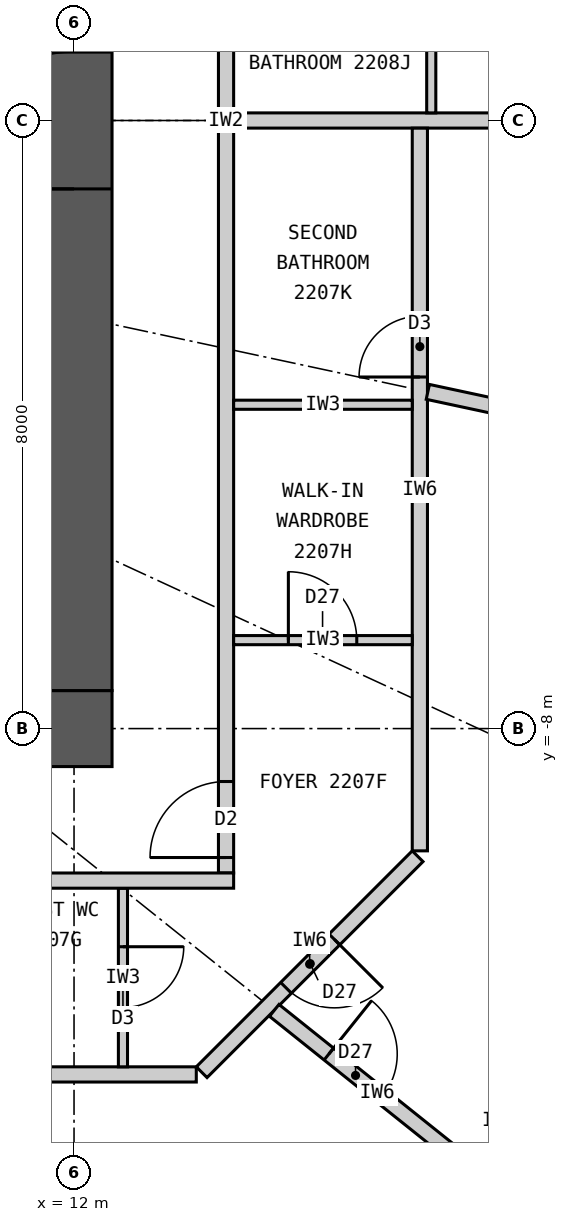
"""IFC4 building model, lengths in metres.
Left out: names, types, materials, properties, quantities, classifications, styles, units other than length and angle.
Written with IfcOpenShell. Run it as: python <this file> out.ifc"""

import sys

from ifc_helpers import new_model, si_unit, direction, frame, frame_2d, origin, place, context, subcontext, project, spatial, rectangle, extrude, element, fill, save


model = new_model("IFC4")
c1 = context("Model", 3, precision=1e-05, world=origin(), true_north=direction((0.0, 1.0)))
c2 = subcontext(c1, "Body", "Model", "MODEL_VIEW")
j1 = project(units=[si_unit("LENGTHUNIT", "METRE"), si_unit("PLANEANGLEUNIT", "RADIAN")], contexts=[c1])
p1 = place(None, origin())
s1 = spatial("IfcSite", under=j1, at=p1, CompositionType="ELEMENT")
p2 = place(p1, origin())
s2 = spatial("IfcBuilding", under=s1, at=p2, CompositionType="ELEMENT")
p3 = place(p2, frame((0.0, 0.0, 87.0)))
s3 = spatial("IfcBuildingStorey", under=s2, at=p3, CompositionType="ELEMENT", Elevation=87.0)
p4 = place(p3, frame((12.5, -8.0, 0.0), z_axis=(0.0, 0.0, 1.0), x_axis=(-1.0, 0.0, 0.0)))
e1 = element("IfcWall", 1, at=p4, inside=s3, PredefinedType="SHEAR", context=c2, shape_type="SweptSolid", body=[
    extrude(rectangle(XDim=25.0, YDim=1.0, at=frame_2d((12.5, 0.0))), origin(), (0.0, 0.0, 1.0), 3.3),
])
p5 = place(p4, frame((11.2, 0.0, 0.0)))
e2 = element("IfcOpeningElement", 2, at=p5, cuts=e1, PredefinedType="OPENING", context=c2, shape_type="SweptSolid", body=[
    extrude(rectangle(XDim=1.2, YDim=2.2, at=frame_2d((0.6, 1.1))), frame((0.0, 0.51, 0.0), z_axis=(0.0, -1.0, 0.0), x_axis=(1.0, 0.0, 0.0)), (0.0, 0.0, 1.0), 1.02),
])
p6 = place(p4, frame((18.8, 0.0, 0.0)))
e3 = element("IfcOpeningElement", 3, at=p6, cuts=e1, PredefinedType="OPENING", context=c2, shape_type="SweptSolid", body=[
    extrude(rectangle(XDim=0.9, YDim=2.2, at=frame_2d((0.45, 1.1))), frame((0.0, 0.51, 0.0), z_axis=(0.0, -1.0, 0.0), x_axis=(1.0, 0.0, 0.0)), (0.0, 0.0, 1.0), 1.02),
])
p7 = place(p3, frame((12.0, -7.5, 0.0), z_axis=(0.0, 0.0, 1.0), x_axis=(0.0, 1.0, 0.0)))
e4 = element("IfcWall", 4, at=p7, inside=s3, PredefinedType="SHEAR", context=c2, shape_type="SweptSolid", body=[
    extrude(rectangle(XDim=15.0, YDim=1.0, at=frame_2d((7.5, 0.0))), origin(), (0.0, 0.0, 1.0), 3.3),
])
p8 = place(p7, frame((6.6, 0.0, 0.0)))
e5 = element("IfcOpeningElement", 5, at=p8, cuts=e4, PredefinedType="OPENING", context=c2, shape_type="SweptSolid", body=[
    extrude(rectangle(XDim=1.8, YDim=2.2, at=frame_2d((0.9, 1.1))), frame((0.0, 0.51, 0.0), z_axis=(0.0, -1.0, 0.0), x_axis=(1.0, 0.0, 0.0)), (0.0, 0.0, 1.0), 1.02),
])
p9 = place(p3, frame((14.0, -9.9, 0.0), z_axis=(0.0, 0.0, 1.0), x_axis=(0.0, 1.0, 0.0)))
e6 = element("IfcWall", 6, at=p9, inside=s3, PredefinedType="PARTITIONING", context=c2, shape_type="SweptSolid", body=[
    extrude(rectangle(XDim=19.8, YDim=0.2, at=frame_2d((9.9, 0.0))), origin(), (0.0, 0.0, 1.0), 3.12),
])
p10 = place(p9, frame((0.204, 0.0, 0.0)))
e7 = element("IfcOpeningElement", 7, at=p10, cuts=e6, PredefinedType="OPENING", context=c2, shape_type="SweptSolid", body=[
    extrude(rectangle(XDim=1.0, YDim=2.2, at=frame_2d((0.5, 1.1))), frame((0.0, 0.11, 0.0), z_axis=(0.0, -1.0, 0.0), x_axis=(1.0, 0.0, 0.0)), (0.0, 0.0, 1.0), 0.22),
])
p11 = place(p9, frame((13.715, 0.0, 0.0)))
e8 = element("IfcOpeningElement", 8, at=p11, cuts=e6, PredefinedType="OPENING", context=c2, shape_type="SweptSolid", body=[
    extrude(rectangle(XDim=1.0, YDim=2.2, at=frame_2d((0.5, 1.1))), frame((0.0, 0.11, 0.0), z_axis=(0.0, -1.0, 0.0), x_axis=(1.0, 0.0, 0.0)), (0.0, 0.0, 1.0), 0.22),
])
p12 = place(p9, frame((18.698, 0.0, 0.0)))
e9 = element("IfcOpeningElement", 9, at=p12, cuts=e6, PredefinedType="OPENING", context=c2, shape_type="SweptSolid", body=[
    extrude(rectangle(XDim=1.0, YDim=2.2, at=frame_2d((0.5, 1.1))), frame((0.0, 0.11, 0.0), z_axis=(0.0, -1.0, 0.0), x_axis=(1.0, 0.0, 0.0)), (0.0, 0.0, 1.0), 0.22),
])
p13 = place(p3, frame((14.1, 0.0, 0.0), z_axis=(0.0, 0.0, 1.0), x_axis=(1.0, 0.0, 0.0)))
e10 = element("IfcWall", 10, at=p13, inside=s3, PredefinedType="PARTITIONING", context=c2, shape_type="SweptSolid", body=[
    extrude(rectangle(XDim=10.75, YDim=0.2, at=frame_2d((5.375, 0.0))), origin(), (0.0, 0.0, 1.0), 2.22),
])
p14 = place(p3, frame((7.289, -10.1, 0.0), z_axis=(0.0, 0.0, 1.0), x_axis=(0.585198353053, -0.810890182197, 0.0)))
e11 = element("IfcWall", 11, at=p14, inside=s3, PredefinedType="PARTITIONING", context=c2, shape_type="SweptSolid", body=[
    extrude(rectangle(XDim=8.36, YDim=0.2, at=frame_2d((4.18, 0.0))), origin(), (0.0, 0.0, 1.0), 2.27),
])
p15 = place(p3, frame((9.232, -12.55, 0.0), z_axis=(0.0, 0.0, 1.0), x_axis=(1.0, 0.0, 0.0)))
e12 = element("IfcWall", 12, at=p15, inside=s3, PredefinedType="PARTITIONING", context=c2, shape_type="SweptSolid", body=[
    extrude(rectangle(XDim=4.377, YDim=0.2, at=frame_2d((2.188, 0.0))), origin(), (0.0, 0.0, 1.0), 3.12),
])
p16 = place(p15, frame((0.685, 0.0, 0.0)))
e13 = element("IfcOpeningElement", 13, at=p16, cuts=e12, PredefinedType="OPENING", context=c2, shape_type="SweptSolid", body=[
    extrude(rectangle(XDim=0.8, YDim=2.1, at=frame_2d((0.4, 1.05))), frame((0.0, 0.11, 0.0), z_axis=(0.0, -1.0, 0.0), x_axis=(1.0, 0.0, 0.0)), (0.0, 0.0, 1.0), 0.22),
])
p17 = place(p3, frame((13.679, -12.521, 0.0), z_axis=(0.0, 0.0, 1.0), x_axis=(0.707106781187, 0.707106781187, 0.0)))
e14 = element("IfcWall", 14, at=p17, inside=s3, PredefinedType="PARTITIONING", context=c2, shape_type="SweptSolid", body=[
    extrude(rectangle(XDim=4.019, YDim=0.2, at=frame_2d((2.009, 0.0))), origin(), (0.0, 0.0, 1.0), 3.12),
])
p18 = place(p17, frame((1.57, 0.0, 0.0)))
e15 = element("IfcOpeningElement", 15, at=p18, cuts=e14, PredefinedType="OPENING", context=c2, shape_type="SweptSolid", body=[
    extrude(rectangle(XDim=0.9, YDim=2.1, at=frame_2d((0.45, 1.05))), frame((0.0, 0.11, 0.0), z_axis=(0.0, -1.0, 0.0), x_axis=(1.0, 0.0, 0.0)), (0.0, 0.0, 1.0), 0.22),
])
p19 = place(p3, frame((16.55, -9.609, 0.0), z_axis=(0.0, 0.0, 1.0), x_axis=(0.0, 1.0, 0.0)))
e16 = element("IfcWall", 16, at=p19, inside=s3, PredefinedType="PARTITIONING", context=c2, shape_type="SweptSolid", body=[
    extrude(rectangle(XDim=9.508, YDim=0.2, at=frame_2d((4.754, 0.0))), origin(), (0.0, 0.0, 1.0), 3.12),
])
p20 = place(p19, frame((6.234, 0.0, 0.0)))
e17 = element("IfcOpeningElement", 17, at=p20, cuts=e16, PredefinedType="OPENING", context=c2, shape_type="SweptSolid", body=[
    extrude(rectangle(XDim=0.8, YDim=2.1, at=frame_2d((0.4, 1.05))), frame((0.0, 0.11, 0.0), z_axis=(0.0, -1.0, 0.0), x_axis=(1.0, 0.0, 0.0)), (0.0, 0.0, 1.0), 0.22),
])
p21 = place(p3, frame((14.634, -11.707, 0.0), z_axis=(0.0, 0.0, 1.0), x_axis=(0.780903110683, -0.624652168591, 0.0)))
e18 = element("IfcWall", 18, at=p21, inside=s3, PredefinedType="PARTITIONING", context=c2, shape_type="SweptSolid", body=[
    extrude(rectangle(XDim=3.472, YDim=0.2, at=frame_2d((1.736, 0.0))), origin(), (0.0, 0.0, 1.0), 2.27),
])
p22 = place(p21, frame((0.92, 0.0, 0.0)))
e19 = element("IfcOpeningElement", 19, at=p22, cuts=e18, PredefinedType="OPENING", context=c2, shape_type="SweptSolid", body=[
    extrude(rectangle(XDim=0.9, YDim=2.1, at=frame_2d((0.45, 1.05))), frame((0.0, 0.11, 0.0), z_axis=(0.0, -1.0, 0.0), x_axis=(1.0, 0.0, 0.0)), (0.0, 0.0, 1.0), 0.22),
])
p23 = place(p3, frame((16.655, -3.57, 0.0), z_axis=(0.0, 0.0, 1.0), x_axis=(0.977790461522, -0.209584859557, 0.0)))
e20 = element("IfcWall", 20, at=p23, inside=s3, PredefinedType="PARTITIONING", context=c2, shape_type="SweptSolid", body=[
    extrude(rectangle(XDim=7.474, YDim=0.2, at=frame_2d((3.737, 0.0))), origin(), (0.0, 0.0, 1.0), 2.27),
])
p24 = place(p23, frame((1.621, 0.0, 0.0)))
e21 = element("IfcOpeningElement", 21, at=p24, cuts=e20, PredefinedType="OPENING", context=c2, shape_type="SweptSolid", body=[
    extrude(rectangle(XDim=0.9, YDim=2.1, at=frame_2d((0.45, 1.05))), frame((0.0, 0.11, 0.0), z_axis=(0.0, -1.0, 0.0), x_axis=(1.0, 0.0, 0.0)), (0.0, 0.0, 1.0), 0.22),
])
p25 = place(p3, frame((12.644, -10.1, 0.0), z_axis=(0.0, 0.0, 1.0), x_axis=(0.0, -1.0, 0.0)))
e22 = element("IfcWall", 22, at=p25, inside=s3, PredefinedType="PARTITIONING", context=c2, shape_type="SweptSolid", body=[
    extrude(rectangle(XDim=2.35, YDim=0.12, at=frame_2d((1.175, 0.0))), origin(), (0.0, 0.0, 1.0), 3.12),
])
p26 = place(p25, frame((0.77, 0.0, 0.0)))
e23 = element("IfcOpeningElement", 23, at=p26, cuts=e22, PredefinedType="OPENING", context=c2, shape_type="SweptSolid", body=[
    extrude(rectangle(XDim=0.8, YDim=2.1, at=frame_2d((0.4, 1.05))), frame((0.0, 0.07, 0.0), z_axis=(0.0, -1.0, 0.0), x_axis=(1.0, 0.0, 0.0)), (0.0, 0.0, 1.0), 0.14),
])
p27 = place(p3, frame((14.1, -6.836, 0.0), z_axis=(0.0, 0.0, 1.0), x_axis=(1.0, 0.0, 0.0)))
e24 = element("IfcWall", 24, at=p27, inside=s3, PredefinedType="PARTITIONING", context=c2, shape_type="SweptSolid", body=[
    extrude(rectangle(XDim=2.35, YDim=0.12, at=frame_2d((1.175, 0.0))), origin(), (0.0, 0.0, 1.0), 3.12),
])
p28 = place(p27, frame((0.72, 0.0, 0.0)))
e25 = element("IfcOpeningElement", 25, at=p28, cuts=e24, PredefinedType="OPENING", context=c2, shape_type="SweptSolid", body=[
    extrude(rectangle(XDim=0.9, YDim=2.1, at=frame_2d((0.45, 1.05))), frame((0.0, 0.07, 0.0), z_axis=(0.0, -1.0, 0.0), x_axis=(1.0, 0.0, 0.0)), (0.0, 0.0, 1.0), 0.14),
])
p29 = place(p3, frame((14.1, -3.74, 0.0), z_axis=(0.0, 0.0, 1.0), x_axis=(1.0, 0.0, 0.0)))
e26 = element("IfcWall", 26, at=p29, inside=s3, PredefinedType="PARTITIONING", context=c2, shape_type="SweptSolid", body=[
    extrude(rectangle(XDim=2.35, YDim=0.12, at=frame_2d((1.175, 0.0))), origin(), (0.0, 0.0, 1.0), 2.27),
])
p30 = place(p3, frame((16.7, 0.1, 0.0), z_axis=(0.0, 0.0, 1.0), x_axis=(0.0, 1.0, 0.0)))
e27 = element("IfcWall", 27, at=p30, inside=s3, PredefinedType="PARTITIONING", context=c2, shape_type="SweptSolid", body=[
    extrude(rectangle(XDim=2.34, YDim=0.12, at=frame_2d((1.17, 0.0))), origin(), (0.0, 0.0, 1.0), 3.12),
])
p31 = place(p3, frame((14.1, -10.0, 0.0), z_axis=(0.0, 0.0, 1.0), x_axis=(-1.0, 0.0, 0.0)))
e28 = element("IfcWall", 28, at=p31, inside=s3, PredefinedType="PARTITIONING", context=c2, shape_type="SweptSolid", body=[
    extrude(rectangle(XDim=24.429, YDim=0.2, at=frame_2d((12.215, 0.0))), origin(), (0.0, 0.0, 1.0), 3.12),
])
p32 = place(p31, frame((13.597, 0.0, 0.0)))
e29 = element("IfcOpeningElement", 29, at=p32, cuts=e28, PredefinedType="OPENING", context=c2, shape_type="SweptSolid", body=[
    extrude(rectangle(XDim=1.0, YDim=2.2, at=frame_2d((0.5, 1.1))), frame((0.0, 0.11, 0.0), z_axis=(0.0, -1.0, 0.0), x_axis=(1.0, 0.0, 0.0)), (0.0, 0.0, 1.0), 0.22),
])
p33 = place(p3, frame((17.361, -13.76, 0.0), z_axis=(0.0, 0.0, 1.0), x_axis=(0.624501042889, 0.781023973659, 0.0)))
e30 = element("IfcWall", 30, at=p33, inside=s3, PredefinedType="PARTITIONING", context=c2, shape_type="SweptSolid", body=[
    extrude(rectangle(XDim=0.767, YDim=0.12, at=frame_2d((0.384, 0.0))), origin(), (0.0, 0.0, 1.0), 3.12),
])
p34 = place(p10, origin())
e31 = element("IfcDoor", 31, at=p34, inside=s3, OperationType="SINGLE_SWING_LEFT", PredefinedType="DOOR", context=c2, shape_type="SweptSolid", body=[
    extrude(rectangle(XDim=1.0, YDim=2.2, at=frame_2d((0.5, 1.1))), frame((0.0, 0.025, 0.0), z_axis=(0.0, -1.0, 0.0), x_axis=(1.0, 0.0, 0.0)), (0.0, 0.0, 1.0), 0.05),
])
fill(e7, e31)
p35 = place(p26, origin())
e32 = element("IfcDoor", 32, at=p35, inside=s3, OperationType="SINGLE_SWING_LEFT", PredefinedType="DOOR", context=c2, shape_type="SweptSolid", body=[
    extrude(rectangle(XDim=0.8, YDim=2.1, at=frame_2d((0.4, 1.05))), frame((0.0, 0.025, 0.0), z_axis=(0.0, -1.0, 0.0), x_axis=(1.0, 0.0, 0.0)), (0.0, 0.0, 1.0), 0.05),
])
fill(e23, e32)
p36 = place(p28, origin())
e33 = element("IfcDoor", 33, at=p36, inside=s3, OperationType="SINGLE_SWING_LEFT", PredefinedType="DOOR", context=c2, shape_type="SweptSolid", body=[
    extrude(rectangle(XDim=0.9, YDim=2.1, at=frame_2d((0.45, 1.05))), frame((0.0, 0.025, 0.0), z_axis=(0.0, -1.0, 0.0), x_axis=(1.0, 0.0, 0.0)), (0.0, 0.0, 1.0), 0.05),
])
fill(e25, e33)
p37 = place(p20, origin())
e34 = element("IfcDoor", 34, at=p37, inside=s3, OperationType="SINGLE_SWING_LEFT", PredefinedType="DOOR", context=c2, shape_type="SweptSolid", body=[
    extrude(rectangle(XDim=0.8, YDim=2.1, at=frame_2d((0.4, 1.05))), frame((0.0, 0.025, 0.0), z_axis=(0.0, -1.0, 0.0), x_axis=(1.0, 0.0, 0.0)), (0.0, 0.0, 1.0), 0.05),
])
fill(e17, e34)
p38 = place(p18, origin())
e35 = element("IfcDoor", 35, at=p38, inside=s3, OperationType="SINGLE_SWING_RIGHT", PredefinedType="DOOR", context=c2, shape_type="SweptSolid", body=[
    extrude(rectangle(XDim=0.9, YDim=2.1, at=frame_2d((0.45, 1.05))), frame((0.0, 0.025, 0.0), z_axis=(0.0, -1.0, 0.0), x_axis=(1.0, 0.0, 0.0)), (0.0, 0.0, 1.0), 0.05),
])
fill(e15, e35)
p39 = place(p22, origin())
e36 = element("IfcDoor", 36, at=p39, inside=s3, OperationType="SINGLE_SWING_LEFT", PredefinedType="DOOR", context=c2, shape_type="SweptSolid", body=[
    extrude(rectangle(XDim=0.9, YDim=2.1, at=frame_2d((0.45, 1.05))), frame((0.0, 0.025, 0.0), z_axis=(0.0, -1.0, 0.0), x_axis=(1.0, 0.0, 0.0)), (0.0, 0.0, 1.0), 0.05),
])
fill(e19, e36)
p40 = place(p8, origin())
e37 = element("IfcDoor", 37, at=p40, inside=s3, OperationType="DOUBLE_DOOR_DOUBLE_SWING", PredefinedType="DOOR", context=c2, shape_type="SweptSolid", body=[
    extrude(rectangle(XDim=1.8, YDim=2.2, at=frame_2d((0.9, 1.1))), frame((0.0, 0.025, 0.0), z_axis=(0.0, -1.0, 0.0), x_axis=(1.0, 0.0, 0.0)), (0.0, 0.0, 1.0), 0.05),
])
fill(e5, e37)
save(model, sys.argv[1])
